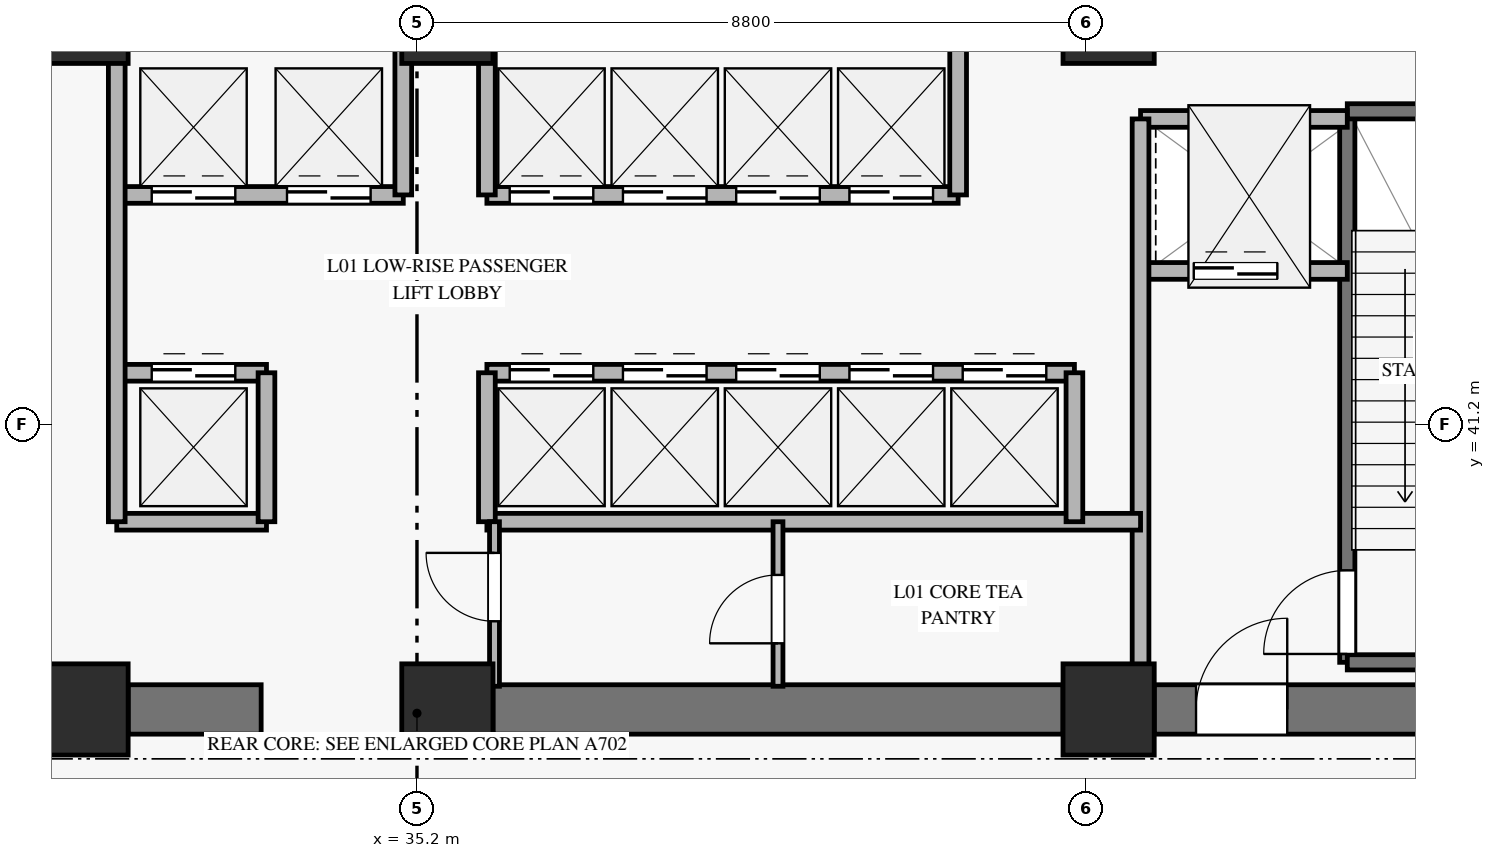
"""IFC4 building model, lengths in metres.
Left out: names, types, materials, properties, quantities, classifications, styles, units other than length and angle.
Written with IfcOpenShell. Run it as: python <this file> out.ifc"""

import sys

from ifc_helpers import new_model, si_unit, direction, frame, frame_2d, origin, origin_2d, place, context, subcontext, project, spatial, rectangle, extrude, source, transform, mapped, element, fill, save


model = new_model("IFC4")
c1 = context("Model", 3, precision=1e-05, world=origin(), true_north=direction((0.0, 1.0)))
c2 = subcontext(c1, "Body", "Model", "MODEL_VIEW")
j1 = project(units=[si_unit("LENGTHUNIT", "METRE"), si_unit("PLANEANGLEUNIT", "RADIAN")], contexts=[c1])
p1 = place(None, origin())
s1 = spatial("IfcSite", under=j1, at=p1, CompositionType="ELEMENT")
p2 = place(p1, origin())
s2 = spatial("IfcBuilding", under=s1, at=p2, CompositionType="ELEMENT")
p3 = place(p2, origin())
s3 = spatial("IfcBuildingStorey", under=s2, at=p3, CompositionType="ELEMENT", Elevation=0.0)
m1 = source(origin(), c2, "Body", "SweptSolid", [
    extrude(rectangle(XDim=1.2, YDim=1.2, at=origin_2d()), origin(), (0.0, 0.0, 1.0), 5.34),
])
for number, where, z_axis, x_axis in (
    (1, (30.8, 37.45, 0.0), (0.0, 0.0, 1.0), (1.0, 0.0, 0.0)),
    (2, (30.8, 46.55, 0.0), (0.0, 0.0, 1.0), (1.0, 0.0, 0.0)),
    (3, (35.6, 37.45, 0.0), (0.0, 0.0, 1.0), (1.0, 0.0, 0.0)),
    (4, (35.6, 46.55, 0.0), (0.0, 0.0, 1.0), (1.0, 0.0, 0.0)),
    (5, (44.3, 37.45, 0.0), (0.0, 0.0, 1.0), (1.0, 0.0, 0.0)),
    (6, (44.3, 46.55, 0.0), (0.0, 0.0, 1.0), (1.0, 0.0, 0.0)),
):
    element("IfcColumn", number, at=place(p3, frame(where, z_axis=z_axis, x_axis=x_axis)), inside=s3, PredefinedType="PILASTER", context=c2, shape_type="MappedRepresentation", body=[
        mapped(m1, transform((0.0, 0.0, 0.0), x_axis=(1.0, 0.0, 0.0), y_axis=(0.0, 1.0, 0.0), z_axis=(0.0, 0.0, 1.0), scale=1.0)),
    ])
p4 = place(p3, frame((31.4, 37.45, 0.0), z_axis=(0.0, 0.0, 1.0), x_axis=(1.0, 0.0, 0.0)))
e7 = element("IfcWall", 7, at=p4, inside=s3, PredefinedType="SHEAR", context=c2, shape_type="SweptSolid", body=[
    extrude(rectangle(XDim=1.75, YDim=0.65, at=frame_2d((0.875, 0.0))), origin(), (0.0, 0.0, 1.0), 5.34),
])
p5 = place(p3, frame((36.2, 37.45, 0.0), z_axis=(0.0, 0.0, 1.0), x_axis=(1.0, 0.0, 0.0)))
e8 = element("IfcWall", 8, at=p5, inside=s3, PredefinedType="SHEAR", context=c2, shape_type="SweptSolid", body=[
    extrude(rectangle(XDim=7.5, YDim=0.65, at=frame_2d((3.75, 0.0))), origin(), (0.0, 0.0, 1.0), 5.34),
])
p6 = place(p3, frame((44.9, 37.45, 0.0), z_axis=(0.0, 0.0, 1.0), x_axis=(1.0, 0.0, 0.0)))
e9 = element("IfcWall", 9, at=p6, inside=s3, PredefinedType="SHEAR", context=c2, shape_type="SweptSolid", body=[
    extrude(rectangle(XDim=5.05, YDim=0.65, at=frame_2d((2.525, 0.0))), origin(), (0.0, 0.0, 1.0), 5.34),
])
p7 = place(p6, frame((0.55, 0.0, 0.0)))
e10 = element("IfcOpeningElement", 10, at=p7, cuts=e9, PredefinedType="OPENING", context=c2, shape_type="SweptSolid", body=[
    extrude(rectangle(XDim=1.2, YDim=2.15, at=frame_2d((0.6, 1.075))), frame((0.0, 0.335, 0.0), z_axis=(0.0, -1.0, 0.0), x_axis=(1.0, 0.0, 0.0)), (0.0, 0.0, 1.0), 0.67),
])
p8 = place(p3, frame((47.44, 38.07, 0.0), z_axis=(0.0, 0.0, 1.0), x_axis=(0.0, 1.0, 0.0)))
e11 = element("IfcWall", 11, at=p8, inside=s3, PredefinedType="SOLIDWALL", context=c2, shape_type="SweptSolid", body=[
    extrude(rectangle(XDim=7.25, YDim=0.2, at=frame_2d((3.625, 0.0))), origin(), (0.0, 0.0, 1.0), 5.6),
])
p9 = place(p8, frame((0.11, 0.0, 0.0)))
e12 = element("IfcOpeningElement", 12, at=p9, cuts=e11, PredefinedType="OPENING", context=c2, shape_type="SweptSolid", body=[
    extrude(rectangle(XDim=1.1, YDim=2.15, at=frame_2d((0.55, 1.075))), frame((0.0, 0.11, 0.0), z_axis=(0.0, -1.0, 0.0), x_axis=(1.0, 0.0, 0.0)), (0.0, 0.0, 1.0), 0.22),
])
for number, where, z_axis, x_axis in (
    (13, (47.44, 45.32, 0.0), (0.0, 0.0, 1.0), (1.0, 0.0, 0.0)),
    (14, (47.44, 38.07, 0.0), (0.0, 0.0, 1.0), (1.0, 0.0, 0.0)),
):
    element("IfcWall", number, at=place(p3, frame(where, z_axis=z_axis, x_axis=x_axis)), inside=s3, PredefinedType="SOLIDWALL", context=c2, shape_type="SweptSolid", body=[
        extrude(rectangle(XDim=2.805, YDim=0.2, at=frame_2d((1.403, 0.0))), origin(), (0.0, 0.0, 1.0), 5.6),
    ])
p10 = place(p3, frame((44.72, 43.22, 0.0), z_axis=(0.0, 0.0, 1.0), x_axis=(1.0, 0.0, 0.0)))
e15 = element("IfcWall", 15, at=p10, inside=s3, PredefinedType="SOLIDWALL", context=c2, shape_type="SweptSolid", body=[
    extrude(rectangle(XDim=2.72, YDim=0.22, at=frame_2d((1.36, 0.0))), origin(), (0.0, 0.0, 1.0), 5.34),
])
p11 = place(p10, frame((0.7, 0.0, 0.0)))
e16 = element("IfcOpeningElement", 16, at=p11, cuts=e15, PredefinedType="OPENING", context=c2, shape_type="SweptSolid", body=[
    extrude(rectangle(XDim=1.1, YDim=2.2, at=frame_2d((0.55, 1.1))), frame((0.0, 0.12, 0.0), z_axis=(0.0, -1.0, 0.0), x_axis=(1.0, 0.0, 0.0)), (0.0, 0.0, 1.0), 0.24),
])
p12 = place(p3, frame((44.72, 45.22, 0.0), z_axis=(0.0, 0.0, 1.0), x_axis=(1.0, 0.0, 0.0)))
e17 = element("IfcWall", 17, at=p12, inside=s3, PredefinedType="SOLIDWALL", context=c2, shape_type="SweptSolid", body=[
    extrude(rectangle(XDim=2.72, YDim=0.22, at=frame_2d((1.36, 0.0))), origin(), (0.0, 0.0, 1.0), 5.34),
])
p13 = place(p3, frame((44.72, 37.755, 0.0), z_axis=(0.0, 0.0, 1.0), x_axis=(0.0, 1.0, 0.0)))
e18 = element("IfcWall", 18, at=p13, inside=s3, PredefinedType="SOLIDWALL", context=c2, shape_type="SweptSolid", body=[
    extrude(rectangle(XDim=7.465, YDim=0.22, at=frame_2d((3.732, 0.0))), origin(), (0.0, 0.0, 1.0), 5.34),
])
p14 = place(p3, frame((31.25, 44.22, 0.0), z_axis=(0.0, 0.0, 1.0), x_axis=(1.0, 0.0, 0.0)))
e19 = element("IfcWall", 19, at=p14, inside=s3, PredefinedType="SOLIDWALL", context=c2, shape_type="SweptSolid", body=[
    extrude(rectangle(XDim=3.77, YDim=0.22, at=frame_2d((1.885, 0.0))), origin(), (0.0, 0.0, 1.0), 5.34),
])
p15 = place(p14, frame((0.46, 0.0, 0.0)))
e20 = element("IfcOpeningElement", 20, at=p15, cuts=e19, PredefinedType="OPENING", context=c2, shape_type="SweptSolid", body=[
    extrude(rectangle(XDim=1.1, YDim=2.2, at=frame_2d((0.55, 1.1))), frame((0.0, 0.12, 0.0), z_axis=(0.0, -1.0, 0.0), x_axis=(1.0, 0.0, 0.0)), (0.0, 0.0, 1.0), 0.24),
])
p16 = place(p14, frame((2.24, 0.0, 0.0)))
e21 = element("IfcOpeningElement", 21, at=p16, cuts=e19, PredefinedType="OPENING", context=c2, shape_type="SweptSolid", body=[
    extrude(rectangle(XDim=1.1, YDim=2.2, at=frame_2d((0.55, 1.1))), frame((0.0, 0.12, 0.0), z_axis=(0.0, -1.0, 0.0), x_axis=(1.0, 0.0, 0.0)), (0.0, 0.0, 1.0), 0.24),
])
p17 = place(p3, frame((36.12, 44.22, 0.0), z_axis=(0.0, 0.0, 1.0), x_axis=(1.0, 0.0, 0.0)))
e22 = element("IfcWall", 22, at=p17, inside=s3, PredefinedType="SOLIDWALL", context=c2, shape_type="SweptSolid", body=[
    extrude(rectangle(XDim=6.2, YDim=0.22, at=frame_2d((3.1, 0.0))), origin(), (0.0, 0.0, 1.0), 5.34),
])
p18 = place(p17, frame((0.3, 0.0, 0.0)))
e23 = element("IfcOpeningElement", 23, at=p18, cuts=e22, PredefinedType="OPENING", context=c2, shape_type="SweptSolid", body=[
    extrude(rectangle(XDim=1.1, YDim=2.2, at=frame_2d((0.55, 1.1))), frame((0.0, 0.12, 0.0), z_axis=(0.0, -1.0, 0.0), x_axis=(1.0, 0.0, 0.0)), (0.0, 0.0, 1.0), 0.24),
])
p19 = place(p17, frame((1.79, 0.0, 0.0)))
e24 = element("IfcOpeningElement", 24, at=p19, cuts=e22, PredefinedType="OPENING", context=c2, shape_type="SweptSolid", body=[
    extrude(rectangle(XDim=1.1, YDim=2.2, at=frame_2d((0.55, 1.1))), frame((0.0, 0.12, 0.0), z_axis=(0.0, -1.0, 0.0), x_axis=(1.0, 0.0, 0.0)), (0.0, 0.0, 1.0), 0.24),
])
p20 = place(p17, frame((3.28, 0.0, 0.0)))
e25 = element("IfcOpeningElement", 25, at=p20, cuts=e22, PredefinedType="OPENING", context=c2, shape_type="SweptSolid", body=[
    extrude(rectangle(XDim=1.1, YDim=2.2, at=frame_2d((0.55, 1.1))), frame((0.0, 0.12, 0.0), z_axis=(0.0, -1.0, 0.0), x_axis=(1.0, 0.0, 0.0)), (0.0, 0.0, 1.0), 0.24),
])
p21 = place(p17, frame((4.77, 0.0, 0.0)))
e26 = element("IfcOpeningElement", 26, at=p21, cuts=e22, PredefinedType="OPENING", context=c2, shape_type="SweptSolid", body=[
    extrude(rectangle(XDim=1.1, YDim=2.2, at=frame_2d((0.55, 1.1))), frame((0.0, 0.12, 0.0), z_axis=(0.0, -1.0, 0.0), x_axis=(1.0, 0.0, 0.0)), (0.0, 0.0, 1.0), 0.24),
])
for number, where, z_axis, x_axis in (
    (27, (35.02, 44.22, 0.0), (0.0, 0.0, 1.0), (0.0, 1.0, 0.0)),
    (28, (36.12, 44.22, 0.0), (0.0, 0.0, 1.0), (0.0, 1.0, 0.0)),
    (29, (42.32, 44.22, 0.0), (0.0, 0.0, 1.0), (0.0, 1.0, 0.0)),
):
    element("IfcWall", number, at=place(p3, frame(where, z_axis=z_axis, x_axis=x_axis)), inside=s3, PredefinedType="SOLIDWALL", context=c2, shape_type="SweptSolid", body=[
        extrude(rectangle(XDim=2.025, YDim=0.22, at=frame_2d((1.013, 0.0))), origin(), (0.0, 0.0, 1.0), 5.34),
    ])
p22 = place(p3, frame((31.25, 41.88, 0.0), z_axis=(0.0, 0.0, 1.0), x_axis=(1.0, 0.0, 0.0)))
e30 = element("IfcWall", 30, at=p22, inside=s3, PredefinedType="SOLIDWALL", context=c2, shape_type="SweptSolid", body=[
    extrude(rectangle(XDim=1.97, YDim=0.22, at=frame_2d((0.985, 0.0))), origin(), (0.0, 0.0, 1.0), 5.34),
])
p23 = place(p22, frame((0.46, 0.0, 0.0)))
e31 = element("IfcOpeningElement", 31, at=p23, cuts=e30, PredefinedType="OPENING", context=c2, shape_type="SweptSolid", body=[
    extrude(rectangle(XDim=1.1, YDim=2.2, at=frame_2d((0.55, 1.1))), frame((0.0, 0.12, 0.0), z_axis=(0.0, -1.0, 0.0), x_axis=(1.0, 0.0, 0.0)), (0.0, 0.0, 1.0), 0.24),
])
p24 = place(p3, frame((36.12, 41.88, 0.0), z_axis=(0.0, 0.0, 1.0), x_axis=(1.0, 0.0, 0.0)))
e32 = element("IfcWall", 32, at=p24, inside=s3, PredefinedType="SOLIDWALL", context=c2, shape_type="SweptSolid", body=[
    extrude(rectangle(XDim=7.73, YDim=0.22, at=frame_2d((3.865, 0.0))), origin(), (0.0, 0.0, 1.0), 5.34),
])
p25 = place(p24, frame((6.26, 0.0, 0.0)))
e33 = element("IfcOpeningElement", 33, at=p25, cuts=e32, PredefinedType="OPENING", context=c2, shape_type="SweptSolid", body=[
    extrude(rectangle(XDim=1.1, YDim=2.2, at=frame_2d((0.55, 1.1))), frame((0.0, 0.12, 0.0), z_axis=(0.0, -1.0, 0.0), x_axis=(1.0, 0.0, 0.0)), (0.0, 0.0, 1.0), 0.24),
])
p26 = place(p24, frame((0.3, 0.0, 0.0)))
e34 = element("IfcOpeningElement", 34, at=p26, cuts=e32, PredefinedType="OPENING", context=c2, shape_type="SweptSolid", body=[
    extrude(rectangle(XDim=1.1, YDim=2.2, at=frame_2d((0.55, 1.1))), frame((0.0, 0.12, 0.0), z_axis=(0.0, -1.0, 0.0), x_axis=(1.0, 0.0, 0.0)), (0.0, 0.0, 1.0), 0.24),
])
p27 = place(p24, frame((1.79, 0.0, 0.0)))
e35 = element("IfcOpeningElement", 35, at=p27, cuts=e32, PredefinedType="OPENING", context=c2, shape_type="SweptSolid", body=[
    extrude(rectangle(XDim=1.1, YDim=2.2, at=frame_2d((0.55, 1.1))), frame((0.0, 0.12, 0.0), z_axis=(0.0, -1.0, 0.0), x_axis=(1.0, 0.0, 0.0)), (0.0, 0.0, 1.0), 0.24),
])
p28 = place(p24, frame((3.28, 0.0, 0.0)))
e36 = element("IfcOpeningElement", 36, at=p28, cuts=e32, PredefinedType="OPENING", context=c2, shape_type="SweptSolid", body=[
    extrude(rectangle(XDim=1.1, YDim=2.2, at=frame_2d((0.55, 1.1))), frame((0.0, 0.12, 0.0), z_axis=(0.0, -1.0, 0.0), x_axis=(1.0, 0.0, 0.0)), (0.0, 0.0, 1.0), 0.24),
])
p29 = place(p24, frame((4.77, 0.0, 0.0)))
e37 = element("IfcOpeningElement", 37, at=p29, cuts=e32, PredefinedType="OPENING", context=c2, shape_type="SweptSolid", body=[
    extrude(rectangle(XDim=1.1, YDim=2.2, at=frame_2d((0.55, 1.1))), frame((0.0, 0.12, 0.0), z_axis=(0.0, -1.0, 0.0), x_axis=(1.0, 0.0, 0.0)), (0.0, 0.0, 1.0), 0.24),
])
p30 = place(p3, frame((31.25, 39.92, 0.0), z_axis=(0.0, 0.0, 1.0), x_axis=(1.0, 0.0, 0.0)))
e38 = element("IfcWall", 38, at=p30, inside=s3, PredefinedType="SOLIDWALL", context=c2, shape_type="SweptSolid", body=[
    extrude(rectangle(XDim=1.97, YDim=0.22, at=frame_2d((0.985, 0.0))), origin(), (0.0, 0.0, 1.0), 5.34),
])
p31 = place(p3, frame((33.22, 39.92, 0.0), z_axis=(0.0, 0.0, 1.0), x_axis=(0.0, 1.0, 0.0)))
e39 = element("IfcWall", 39, at=p31, inside=s3, PredefinedType="SOLIDWALL", context=c2, shape_type="SweptSolid", body=[
    extrude(rectangle(XDim=1.96, YDim=0.22, at=frame_2d((0.98, 0.0))), origin(), (0.0, 0.0, 1.0), 5.34),
])
p32 = place(p3, frame((36.12, 39.92, 0.0), z_axis=(0.0, 0.0, 1.0), x_axis=(1.0, 0.0, 0.0)))
e40 = element("IfcWall", 40, at=p32, inside=s3, PredefinedType="SOLIDWALL", context=c2, shape_type="SweptSolid", body=[
    extrude(rectangle(XDim=8.6, YDim=0.22, at=frame_2d((4.3, 0.0))), origin(), (0.0, 0.0, 1.0), 4.625),
])
p33 = place(p3, frame((36.12, 39.92, 0.0), z_axis=(0.0, 0.0, 1.0), x_axis=(0.0, 1.0, 0.0)))
e41 = element("IfcWall", 41, at=p33, inside=s3, PredefinedType="SOLIDWALL", context=c2, shape_type="SweptSolid", body=[
    extrude(rectangle(XDim=1.96, YDim=0.22, at=frame_2d((0.98, 0.0))), origin(), (0.0, 0.0, 1.0), 5.34),
])
p34 = place(p3, frame((31.25, 39.92, 0.0), z_axis=(0.0, 0.0, 1.0), x_axis=(0.0, 1.0, 0.0)))
e42 = element("IfcWall", 42, at=p34, inside=s3, PredefinedType="SOLIDWALL", context=c2, shape_type="SweptSolid", body=[
    extrude(rectangle(XDim=6.325, YDim=0.22, at=frame_2d((3.163, 0.0))), origin(), (0.0, 0.0, 1.0), 5.34),
])
p35 = place(p3, frame((43.85, 39.92, 0.0), z_axis=(0.0, 0.0, 1.0), x_axis=(0.0, 1.0, 0.0)))
e43 = element("IfcWall", 43, at=p35, inside=s3, PredefinedType="SOLIDWALL", context=c2, shape_type="SweptSolid", body=[
    extrude(rectangle(XDim=1.96, YDim=0.22, at=frame_2d((0.98, 0.0))), origin(), (0.0, 0.0, 1.0), 5.34),
])
p36 = place(p3, frame((36.22, 37.755, 0.0), z_axis=(0.0, 0.0, 1.0), x_axis=(0.0, 1.0, 0.0)))
e44 = element("IfcWall", 44, at=p36, inside=s3, PredefinedType="PARTITIONING", context=c2, shape_type="SweptSolid", body=[
    extrude(rectangle(XDim=2.165, YDim=0.13, at=frame_2d((1.083, 0.0))), origin(), (0.0, 0.0, 1.0), 5.34),
])
p37 = place(p36, frame((0.855, 0.0, 0.0)))
e45 = element("IfcOpeningElement", 45, at=p37, cuts=e44, PredefinedType="OPENING", context=c2, shape_type="SweptSolid", body=[
    extrude(rectangle(XDim=0.9, YDim=2.1, at=frame_2d((0.45, 1.05))), frame((0.0, 0.075, 0.0), z_axis=(0.0, -1.0, 0.0), x_axis=(1.0, 0.0, 0.0)), (0.0, 0.0, 1.0), 0.15),
])
p38 = place(p3, frame((39.95, 37.755, 0.0), z_axis=(0.0, 0.0, 1.0), x_axis=(0.0, 1.0, 0.0)))
e46 = element("IfcWall", 46, at=p38, inside=s3, PredefinedType="PARTITIONING", context=c2, shape_type="SweptSolid", body=[
    extrude(rectangle(XDim=2.165, YDim=0.13, at=frame_2d((1.083, 0.0))), origin(), (0.0, 0.0, 1.0), 5.34),
])
p39 = place(p38, frame((0.565, 0.0, 0.0)))
e47 = element("IfcOpeningElement", 47, at=p39, cuts=e46, PredefinedType="OPENING", context=c2, shape_type="SweptSolid", body=[
    extrude(rectangle(XDim=0.9, YDim=2.1, at=frame_2d((0.45, 1.05))), frame((0.0, 0.075, 0.0), z_axis=(0.0, -1.0, 0.0), x_axis=(1.0, 0.0, 0.0)), (0.0, 0.0, 1.0), 0.15),
])
m2 = source(origin(), c2, "Body", "SweptSolid", [
    extrude(rectangle(XDim=1.1, YDim=2.15, at=frame_2d((0.55, 1.075))), frame((0.0, 0.025, 0.0), z_axis=(0.0, -1.0, 0.0), x_axis=(1.0, 0.0, 0.0)), (0.0, 0.0, 1.0), 0.05),
])
p40 = place(p9, origin())
e48 = element("IfcDoor", 48, at=p40, inside=s3, OperationType="SINGLE_SWING_LEFT", PredefinedType="DOOR", context=c2, shape_type="MappedRepresentation", body=[
    mapped(m2, transform((0.0, 0.0, 0.0), x_axis=(1.0, 0.0, 0.0), y_axis=(0.0, 1.0, 0.0), z_axis=(0.0, 0.0, 1.0), scale=1.0)),
])
fill(e12, e48)
m3 = source(origin(), c2, "Body", "SweptSolid", [
    extrude(rectangle(XDim=1.1, YDim=2.2, at=frame_2d((0.55, 1.1))), frame((0.0, 0.025, 0.0), z_axis=(0.0, -1.0, 0.0), x_axis=(1.0, 0.0, 0.0)), (0.0, 0.0, 1.0), 0.05),
])
p41 = place(p11, origin())
e49 = element("IfcDoor", 49, at=p41, inside=s3, OperationType="SLIDING_TO_LEFT", PredefinedType="DOOR", context=c2, shape_type="MappedRepresentation", body=[
    mapped(m3, transform((0.0, 0.0, 0.0), x_axis=(1.0, 0.0, 0.0), y_axis=(0.0, 1.0, 0.0), z_axis=(0.0, 0.0, 1.0), scale=1.0)),
])
fill(e16, e49)
m4 = source(origin(), c2, "Body", "SweptSolid", [
    extrude(rectangle(XDim=1.2, YDim=2.15, at=frame_2d((0.6, 1.075))), frame((0.0, 0.025, 0.0), z_axis=(0.0, -1.0, 0.0), x_axis=(1.0, 0.0, 0.0)), (0.0, 0.0, 1.0), 0.05),
])
p42 = place(p7, origin())
e50 = element("IfcDoor", 50, at=p42, inside=s3, OperationType="SINGLE_SWING_RIGHT", PredefinedType="DOOR", context=c2, shape_type="MappedRepresentation", body=[
    mapped(m4, transform((0.0, 0.0, 0.0), x_axis=(1.0, 0.0, 0.0), y_axis=(0.0, 1.0, 0.0), z_axis=(0.0, 0.0, 1.0), scale=1.0)),
])
fill(e10, e50)
p43 = place(p15, origin())
e51 = element("IfcDoor", 51, at=p43, inside=s3, OperationType="SLIDING_TO_LEFT", PredefinedType="DOOR", context=c2, shape_type="MappedRepresentation", body=[
    mapped(m3, transform((0.0, 0.0, 0.0), x_axis=(1.0, 0.0, 0.0), y_axis=(0.0, 1.0, 0.0), z_axis=(0.0, 0.0, 1.0), scale=1.0)),
])
fill(e20, e51)
p44 = place(p16, origin())
e52 = element("IfcDoor", 52, at=p44, inside=s3, OperationType="SLIDING_TO_LEFT", PredefinedType="DOOR", context=c2, shape_type="MappedRepresentation", body=[
    mapped(m3, transform((0.0, 0.0, 0.0), x_axis=(1.0, 0.0, 0.0), y_axis=(0.0, 1.0, 0.0), z_axis=(0.0, 0.0, 1.0), scale=1.0)),
])
fill(e21, e52)
p45 = place(p23, origin())
e53 = element("IfcDoor", 53, at=p45, inside=s3, OperationType="SLIDING_TO_LEFT", PredefinedType="DOOR", context=c2, shape_type="MappedRepresentation", body=[
    mapped(m3, transform((0.0, 0.0, 0.0), x_axis=(1.0, 0.0, 0.0), y_axis=(0.0, 1.0, 0.0), z_axis=(0.0, 0.0, 1.0), scale=1.0)),
])
fill(e31, e53)
p46 = place(p25, origin())
e54 = element("IfcDoor", 54, at=p46, inside=s3, OperationType="SLIDING_TO_LEFT", PredefinedType="DOOR", context=c2, shape_type="MappedRepresentation", body=[
    mapped(m3, transform((0.0, 0.0, 0.0), x_axis=(1.0, 0.0, 0.0), y_axis=(0.0, 1.0, 0.0), z_axis=(0.0, 0.0, 1.0), scale=1.0)),
])
fill(e33, e54)
p47 = place(p18, origin())
e55 = element("IfcDoor", 55, at=p47, inside=s3, OperationType="SLIDING_TO_LEFT", PredefinedType="DOOR", context=c2, shape_type="MappedRepresentation", body=[
    mapped(m3, transform((0.0, 0.0, 0.0), x_axis=(1.0, 0.0, 0.0), y_axis=(0.0, 1.0, 0.0), z_axis=(0.0, 0.0, 1.0), scale=1.0)),
])
fill(e23, e55)
p48 = place(p19, origin())
e56 = element("IfcDoor", 56, at=p48, inside=s3, OperationType="SLIDING_TO_LEFT", PredefinedType="DOOR", context=c2, shape_type="MappedRepresentation", body=[
    mapped(m3, transform((0.0, 0.0, 0.0), x_axis=(1.0, 0.0, 0.0), y_axis=(0.0, 1.0, 0.0), z_axis=(0.0, 0.0, 1.0), scale=1.0)),
])
fill(e24, e56)
p49 = place(p26, origin())
e57 = element("IfcDoor", 57, at=p49, inside=s3, OperationType="SLIDING_TO_LEFT", PredefinedType="DOOR", context=c2, shape_type="MappedRepresentation", body=[
    mapped(m3, transform((0.0, 0.0, 0.0), x_axis=(1.0, 0.0, 0.0), y_axis=(0.0, 1.0, 0.0), z_axis=(0.0, 0.0, 1.0), scale=1.0)),
])
fill(e34, e57)
p50 = place(p27, origin())
e58 = element("IfcDoor", 58, at=p50, inside=s3, OperationType="SLIDING_TO_LEFT", PredefinedType="DOOR", context=c2, shape_type="MappedRepresentation", body=[
    mapped(m3, transform((0.0, 0.0, 0.0), x_axis=(1.0, 0.0, 0.0), y_axis=(0.0, 1.0, 0.0), z_axis=(0.0, 0.0, 1.0), scale=1.0)),
])
fill(e35, e58)
p51 = place(p20, origin())
e59 = element("IfcDoor", 59, at=p51, inside=s3, OperationType="SLIDING_TO_LEFT", PredefinedType="DOOR", context=c2, shape_type="MappedRepresentation", body=[
    mapped(m3, transform((0.0, 0.0, 0.0), x_axis=(1.0, 0.0, 0.0), y_axis=(0.0, 1.0, 0.0), z_axis=(0.0, 0.0, 1.0), scale=1.0)),
])
fill(e25, e59)
p52 = place(p21, origin())
e60 = element("IfcDoor", 60, at=p52, inside=s3, OperationType="SLIDING_TO_LEFT", PredefinedType="DOOR", context=c2, shape_type="MappedRepresentation", body=[
    mapped(m3, transform((0.0, 0.0, 0.0), x_axis=(1.0, 0.0, 0.0), y_axis=(0.0, 1.0, 0.0), z_axis=(0.0, 0.0, 1.0), scale=1.0)),
])
fill(e26, e60)
p53 = place(p28, origin())
e61 = element("IfcDoor", 61, at=p53, inside=s3, OperationType="SLIDING_TO_LEFT", PredefinedType="DOOR", context=c2, shape_type="MappedRepresentation", body=[
    mapped(m3, transform((0.0, 0.0, 0.0), x_axis=(1.0, 0.0, 0.0), y_axis=(0.0, 1.0, 0.0), z_axis=(0.0, 0.0, 1.0), scale=1.0)),
])
fill(e36, e61)
p54 = place(p29, origin())
e62 = element("IfcDoor", 62, at=p54, inside=s3, OperationType="SLIDING_TO_LEFT", PredefinedType="DOOR", context=c2, shape_type="MappedRepresentation", body=[
    mapped(m3, transform((0.0, 0.0, 0.0), x_axis=(1.0, 0.0, 0.0), y_axis=(0.0, 1.0, 0.0), z_axis=(0.0, 0.0, 1.0), scale=1.0)),
])
fill(e37, e62)
m5 = source(origin(), c2, "Body", "SweptSolid", [
    extrude(rectangle(XDim=0.9, YDim=2.1, at=frame_2d((0.45, 1.05))), frame((0.0, 0.025, 0.0), z_axis=(0.0, -1.0, 0.0), x_axis=(1.0, 0.0, 0.0)), (0.0, 0.0, 1.0), 0.05),
])
p55 = place(p37, origin())
e63 = element("IfcDoor", 63, at=p55, inside=s3, OperationType="SINGLE_SWING_RIGHT", PredefinedType="DOOR", context=c2, shape_type="MappedRepresentation", body=[
    mapped(m5, transform((0.0, 0.0, 0.0), x_axis=(1.0, 0.0, 0.0), y_axis=(0.0, 1.0, 0.0), z_axis=(0.0, 0.0, 1.0), scale=1.0)),
])
fill(e45, e63)
p56 = place(p39, origin())
e64 = element("IfcDoor", 64, at=p56, inside=s3, OperationType="SINGLE_SWING_LEFT", PredefinedType="DOOR", context=c2, shape_type="MappedRepresentation", body=[
    mapped(m5, transform((0.0, 0.0, 0.0), x_axis=(1.0, 0.0, 0.0), y_axis=(0.0, 1.0, 0.0), z_axis=(0.0, 0.0, 1.0), scale=1.0)),
])
fill(e47, e64)
save(model, sys.argv[1])
